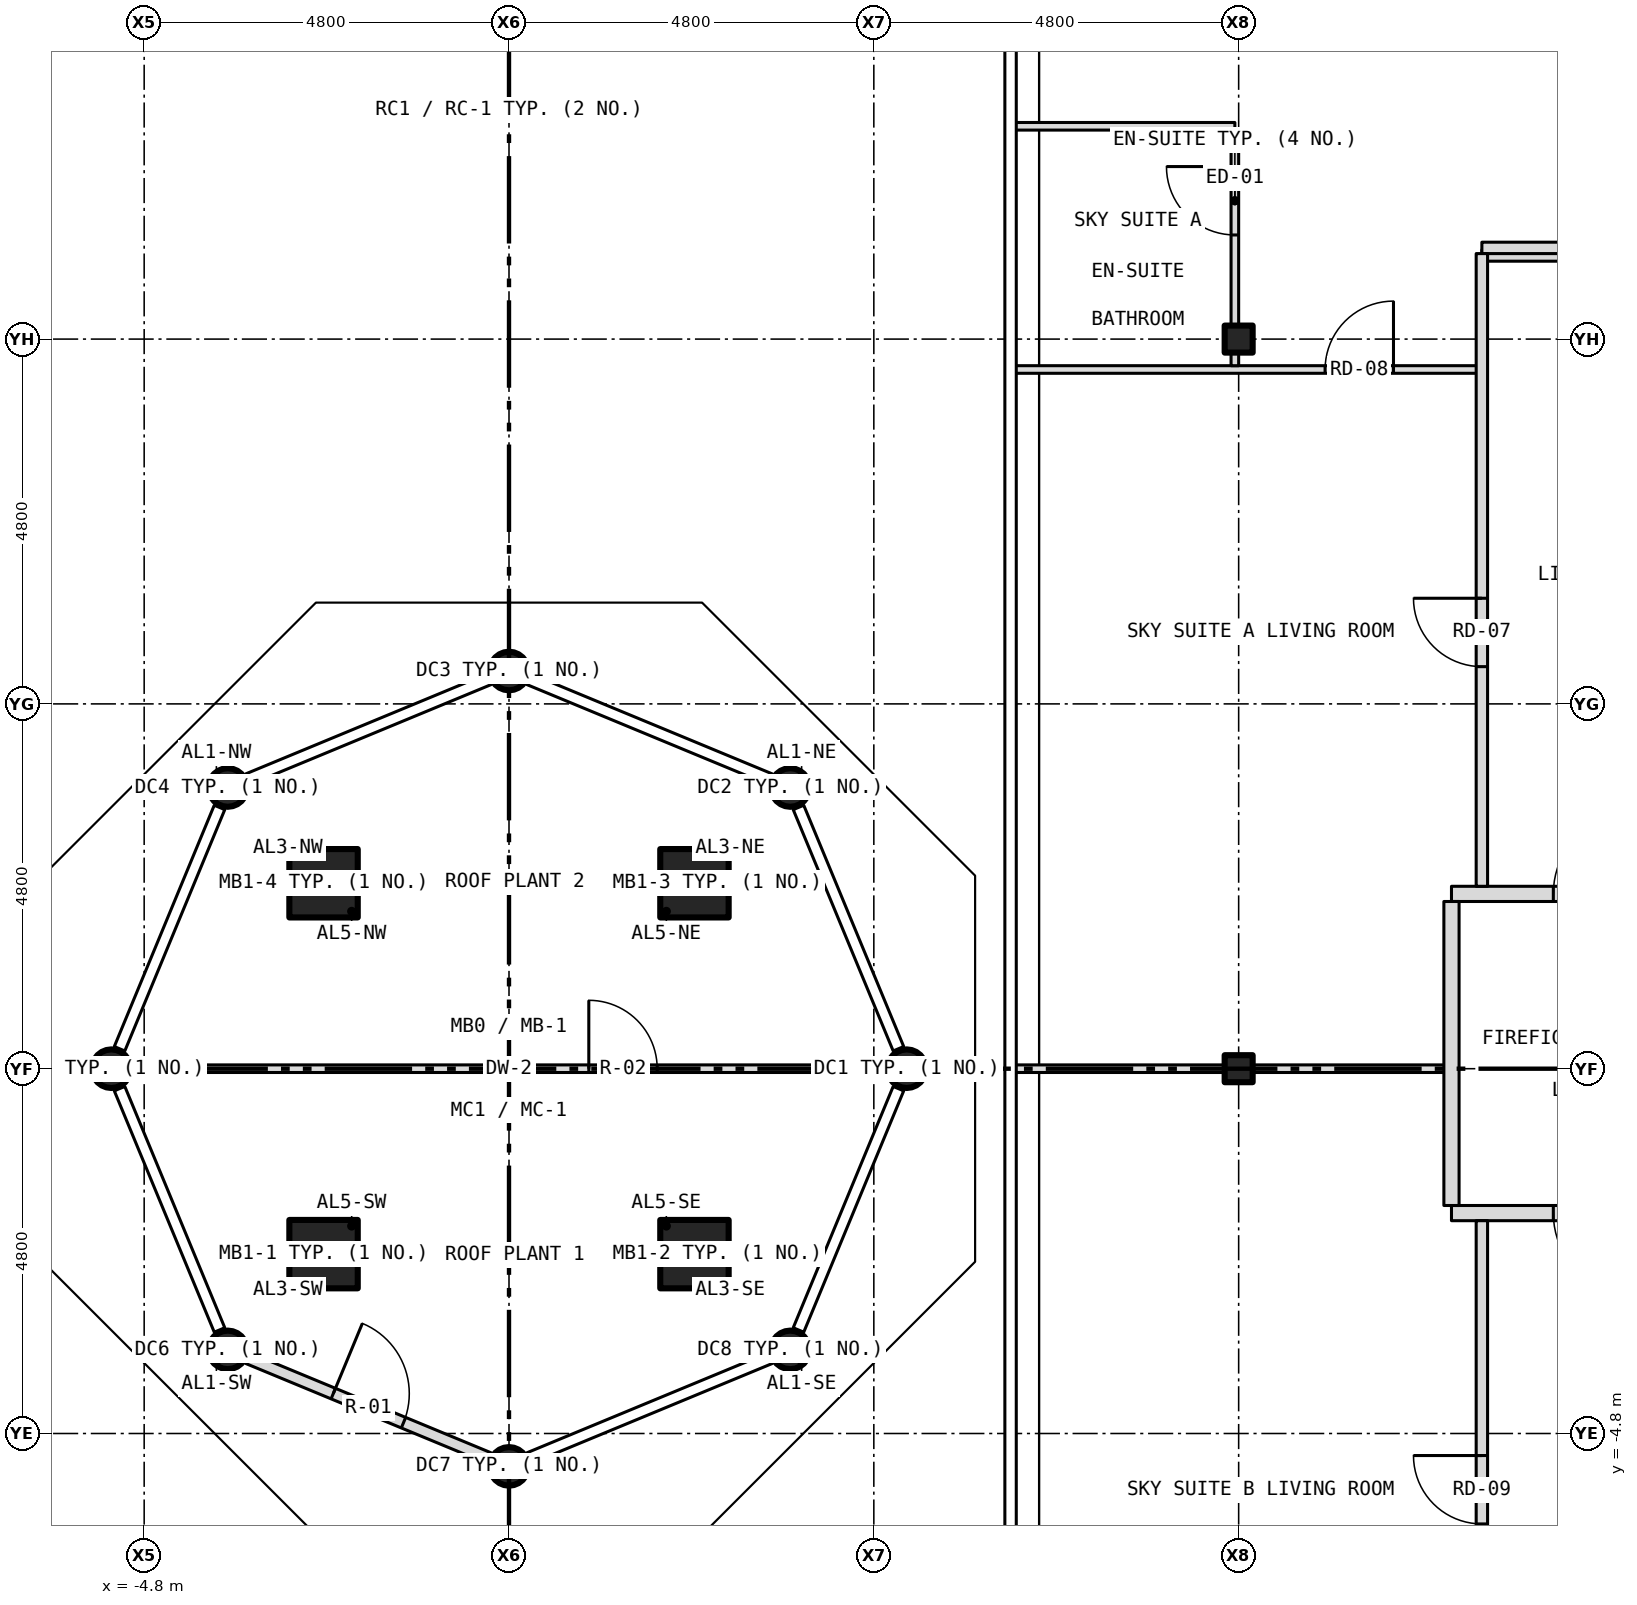
"""IFC4 building model, lengths in metres.
Left out: names, types, materials, properties, quantities, classifications, styles, units other than length and angle.
Written with IfcOpenShell. Run it as: python <this file> out.ifc"""

import sys

from ifc_helpers import new_model, si_unit, direction, frame, frame_2d, origin, origin_2d, place, context, subcontext, project, spatial, rectangle, hollow_circle, i_section, extrude, element, fill, save


model = new_model("IFC4")
c1 = context("Model", 3, precision=1e-05, world=origin(), true_north=direction((0.0, 1.0)))
c2 = subcontext(c1, "Body", "Model", "MODEL_VIEW")
j1 = project(units=[si_unit("LENGTHUNIT", "METRE"), si_unit("PLANEANGLEUNIT", "RADIAN")], contexts=[c1])
p1 = place(None, origin())
s1 = spatial("IfcSite", under=j1, at=p1, CompositionType="ELEMENT")
p2 = place(p1, origin())
s2 = spatial("IfcBuilding", under=s1, at=p2, CompositionType="ELEMENT")
p3 = place(p2, frame((0.0, 0.0, 265.5)))
s3 = spatial("IfcBuildingStorey", under=s2, at=p3, CompositionType="ELEMENT", Elevation=265.5)
for number, where, z_axis, x_axis in (
    (1, (9.6, 0.0, -0.25), (0.0, 0.0, 1.0), (1.0, 0.0, 0.0)),
    (2, (9.6, 9.6, -0.25), (0.0, 0.0, 1.0), (1.0, 0.0, 0.0)),
):
    element("IfcColumn", number, at=place(p3, frame(where, z_axis=z_axis, x_axis=x_axis)), inside=s3, PredefinedType="COLUMN", context=c2, shape_type="SweptSolid", body=[
        extrude(i_section(OverallWidth=0.368, OverallDepth=0.356, WebThickness=0.011, FlangeThickness=0.018, at=origin_2d()), origin(), (0.0, 0.0, 1.0), 3.6),
    ])
for number, where, z_axis, x_axis in (
    (3, (5.233, 0.0, 0.5), (0.0, 0.0, 1.0), (1.0, 0.0, 0.0)),
    (4, (3.7, 3.7, 0.5), (0.0, 0.0, 1.0), (1.0, 0.0, 0.0)),
    (5, (0.0, 5.233, 0.5), (0.0, 0.0, 1.0), (1.0, 0.0, 0.0)),
    (6, (-3.7, 3.7, 0.5), (0.0, 0.0, 1.0), (1.0, 0.0, 0.0)),
    (7, (-5.233, 0.0, 0.5), (0.0, 0.0, 1.0), (1.0, 0.0, 0.0)),
    (8, (-3.7, -3.7, 0.5), (0.0, 0.0, 1.0), (1.0, 0.0, 0.0)),
    (9, (0.0, -5.233, 0.5), (0.0, 0.0, 1.0), (1.0, 0.0, 0.0)),
    (10, (3.7, -3.7, 0.5), (0.0, 0.0, 1.0), (1.0, 0.0, 0.0)),
):
    element("IfcColumn", number, at=place(p3, frame(where, z_axis=z_axis, x_axis=x_axis)), inside=s3, PredefinedType="COLUMN", context=c2, shape_type="SweptSolid", body=[
        extrude(hollow_circle(Radius=0.254, WallThickness=0.012, at=origin_2d()), origin(), (0.0, 0.0, 1.0), 3.0),
    ])
p4 = place(p3, frame((-3.438, -3.809, 0.5), z_axis=(0.0, 0.0, 1.0), x_axis=(0.923875699159, -0.382692686764, 0.0)))
e11 = element("IfcWall", 11, at=p4, inside=s3, PredefinedType="SOLIDWALL", context=c2, shape_type="SweptSolid", body=[
    extrude(rectangle(XDim=3.437, YDim=0.15, at=frame_2d((1.718, 0.0))), origin(), (0.0, 0.0, 1.0), 6.3),
])
p5 = place(p4, frame((1.219, 0.0, 0.0)))
e12 = element("IfcOpeningElement", 12, at=p5, cuts=e11, PredefinedType="OPENING", context=c2, shape_type="SweptSolid", body=[
    extrude(rectangle(XDim=1.0, YDim=2.1, at=frame_2d((0.5, 1.05))), frame((0.0, 0.087, 0.0), z_axis=(0.0, -1.0, 0.0), x_axis=(1.0, 0.0, 0.0)), (0.0, 0.0, 1.0), 0.174),
])
p6 = place(p3, frame((-4.979, 0.0, 0.5), z_axis=(0.0, 0.0, 1.0), x_axis=(1.0, 0.0, 0.0)))
e13 = element("IfcWall", 13, at=p6, inside=s3, PredefinedType="PARTITIONING", context=c2, shape_type="SweptSolid", body=[
    extrude(rectangle(XDim=9.957, YDim=0.1, at=frame_2d((4.979, 0.0))), origin(), (0.0, 0.0, 1.0), 6.294),
])
p7 = place(p6, frame((6.029, 0.0, 0.0)))
e14 = element("IfcOpeningElement", 14, at=p7, cuts=e13, PredefinedType="OPENING", context=c2, shape_type="SweptSolid", body=[
    extrude(rectangle(XDim=0.9, YDim=2.1, at=frame_2d((0.45, 1.05))), frame((0.0, 0.062, 0.0), z_axis=(0.0, -1.0, 0.0), x_axis=(1.0, 0.0, 0.0)), (0.0, 0.0, 1.0), 0.124),
])
for number, where, z_axis, x_axis in (
    (15, (-2.44, -2.44, 43.7), (0.0, 0.0, 1.0), (1.0, 0.0, 0.0)),
    (16, (2.44, -2.44, 43.7), (0.0, 0.0, 1.0), (1.0, 0.0, 0.0)),
    (17, (2.44, 2.44, 43.7), (0.0, 0.0, 1.0), (1.0, 0.0, 0.0)),
    (18, (-2.44, 2.44, 43.7), (0.0, 0.0, 1.0), (1.0, 0.0, 0.0)),
):
    element("IfcColumn", number, at=place(p3, frame(where, z_axis=z_axis, x_axis=x_axis)), inside=s3, PredefinedType="COLUMN", context=c2, shape_type="SweptSolid", body=[
        extrude(rectangle(XDim=0.9, YDim=0.9, at=origin_2d()), origin(), (0.0, 0.0, 1.0), 0.2),
    ])
p8 = place(p3, frame((12.4, -1.9, 0.0), z_axis=(0.0, 0.0, 1.0), x_axis=(1.0, 0.0, 0.0)))
e19 = element("IfcWall", 19, at=p8, inside=s3, PredefinedType="PARTITIONING", context=c2, shape_type="SweptSolid", body=[
    extrude(rectangle(XDim=3.28, YDim=0.2, at=frame_2d((1.64, 0.0))), origin(), (0.0, 0.0, 1.0), 3.35),
])
p9 = place(p8, frame((1.34, 0.0, 0.0)))
e20 = element("IfcOpeningElement", 20, at=p9, cuts=e19, PredefinedType="OPENING", context=c2, shape_type="SweptSolid", body=[
    extrude(rectangle(XDim=1.1, YDim=2.1, at=frame_2d((0.55, 1.05))), frame((0.0, 0.112, 0.0), z_axis=(0.0, -1.0, 0.0), x_axis=(1.0, 0.0, 0.0)), (0.0, 0.0, 1.0), 0.224),
])
p10 = place(p3, frame((6.644, 0.0, 0.0), z_axis=(0.0, 0.0, 1.0), x_axis=(1.0, 0.0, 0.0)))
e21 = element("IfcWall", 21, at=p10, inside=s3, PredefinedType="PARTITIONING", context=c2, shape_type="SweptSolid", body=[
    extrude(rectangle(XDim=2.772, YDim=0.1, at=frame_2d((1.386, 0.0))), origin(), (0.0, 0.0, 1.0), 2.728),
])
p11 = place(p3, frame((9.416, 0.0, 0.0), z_axis=(0.0, 0.0, 1.0), x_axis=(1.0, 0.0, 0.0)))
e22 = element("IfcWall", 22, at=p11, inside=s3, PredefinedType="PARTITIONING", context=c2, shape_type="SweptSolid", body=[
    extrude(rectangle(XDim=0.368, YDim=0.1, at=frame_2d((0.184, 0.0))), origin(), (0.0, 0.0, 1.0), 3.35),
])
p12 = place(p3, frame((9.784, 0.0, 0.0), z_axis=(0.0, 0.0, 1.0), x_axis=(1.0, 0.0, 0.0)))
e23 = element("IfcWall", 23, at=p12, inside=s3, PredefinedType="PARTITIONING", context=c2, shape_type="SweptSolid", body=[
    extrude(rectangle(XDim=2.616, YDim=0.1, at=frame_2d((1.308, 0.0))), origin(), (0.0, 0.0, 1.0), 2.728),
])
p13 = place(p3, frame((12.4, 2.3, 0.0), z_axis=(0.0, 0.0, 1.0), x_axis=(1.0, 0.0, 0.0)))
e24 = element("IfcWall", 24, at=p13, inside=s3, PredefinedType="PARTITIONING", context=c2, shape_type="SweptSolid", body=[
    extrude(rectangle(XDim=3.28, YDim=0.2, at=frame_2d((1.64, 0.0))), origin(), (0.0, 0.0, 1.0), 3.35),
])
p14 = place(p13, frame((1.34, 0.0, 0.0)))
e25 = element("IfcOpeningElement", 25, at=p14, cuts=e24, PredefinedType="OPENING", context=c2, shape_type="SweptSolid", body=[
    extrude(rectangle(XDim=1.1, YDim=2.1, at=frame_2d((0.55, 1.05))), frame((0.0, 0.112, 0.0), z_axis=(0.0, -1.0, 0.0), x_axis=(1.0, 0.0, 0.0)), (0.0, 0.0, 1.0), 0.224),
])
p15 = place(p3, frame((6.644, 9.2, 0.0), z_axis=(0.0, 0.0, 1.0), x_axis=(1.0, 0.0, 0.0)))
e26 = element("IfcWall", 26, at=p15, inside=s3, PredefinedType="PARTITIONING", context=c2, shape_type="SweptSolid", body=[
    extrude(rectangle(XDim=6.156, YDim=0.1, at=frame_2d((3.078, 0.0))), origin(), (0.0, 0.0, 1.0), 3.35),
])
p16 = place(p15, frame((4.093, 0.0, 0.0)))
e27 = element("IfcOpeningElement", 27, at=p16, cuts=e26, PredefinedType="OPENING", context=c2, shape_type="SweptSolid", body=[
    extrude(rectangle(XDim=0.9, YDim=2.1, at=frame_2d((0.45, 1.05))), frame((0.0, 0.062, 0.0), z_axis=(0.0, -1.0, 0.0), x_axis=(1.0, 0.0, 0.0)), (0.0, 0.0, 1.0), 0.124),
])
for number, where, z_axis, x_axis in (
    (28, (12.8, 10.7, 0.0), (0.0, 0.0, 1.0), (1.0, 0.0, 0.0)),
    (29, (12.8, 10.8, 0.0), (0.0, 0.0, 1.0), (1.0, 0.0, 0.0)),
):
    element("IfcWall", number, at=place(p3, frame(where, z_axis=z_axis, x_axis=x_axis)), inside=s3, PredefinedType="PARTITIONING", context=c2, shape_type="SweptSolid", body=[
        extrude(rectangle(XDim=2.88, YDim=0.15, at=frame_2d((1.44, 0.0))), origin(), (0.0, 0.0, 1.0), 3.35),
    ])
p17 = place(p3, frame((6.644, 12.4, 0.0), z_axis=(0.0, 0.0, 1.0), x_axis=(1.0, 0.0, 0.0)))
e30 = element("IfcWall", 30, at=p17, inside=s3, PredefinedType="PARTITIONING", context=c2, shape_type="SweptSolid", body=[
    extrude(rectangle(XDim=2.906, YDim=0.1, at=frame_2d((1.453, 0.0))), origin(), (0.0, 0.0, 1.0), 3.35),
])
p18 = place(p3, frame((9.55, 9.25, 0.0), z_axis=(0.0, 0.0, 1.0), x_axis=(0.0, 1.0, 0.0)))
e31 = element("IfcWall", 31, at=p18, inside=s3, PredefinedType="PARTITIONING", context=c2, shape_type="SweptSolid", body=[
    extrude(rectangle(XDim=0.534, YDim=0.1, at=frame_2d((0.267, 0.0))), origin(), (0.0, 0.0, 1.0), 3.35),
])
p19 = place(p3, frame((9.55, 9.784, 0.0), z_axis=(0.0, 0.0, 1.0), x_axis=(0.0, 1.0, 0.0)))
e32 = element("IfcWall", 32, at=p19, inside=s3, PredefinedType="PARTITIONING", context=c2, shape_type="SweptSolid", body=[
    extrude(rectangle(XDim=2.566, YDim=0.1, at=frame_2d((1.283, 0.0))), origin(), (0.0, 0.0, 1.0), 2.728),
])
p20 = place(p19, frame((1.186, 0.0, 0.0)))
e33 = element("IfcOpeningElement", 33, at=p20, cuts=e32, PredefinedType="OPENING", context=c2, shape_type="SweptSolid", body=[
    extrude(rectangle(XDim=0.9, YDim=2.1, at=frame_2d((0.45, 1.05))), frame((0.0, 0.062, 0.0), z_axis=(0.0, -1.0, 0.0), x_axis=(1.0, 0.0, 0.0)), (0.0, 0.0, 1.0), 0.124),
])
p21 = place(p3, frame((12.4, -1.8, 0.0), z_axis=(0.0, 0.0, 1.0), x_axis=(0.0, 1.0, 0.0)))
e34 = element("IfcWall", 34, at=p21, inside=s3, PredefinedType="PARTITIONING", context=c2, shape_type="SweptSolid", body=[
    extrude(rectangle(XDim=4.0, YDim=0.2, at=frame_2d((2.0, 0.0))), origin(), (0.0, 0.0, 1.0), 3.35),
])
p22 = place(p3, frame((12.8, -10.725, 0.0), z_axis=(0.0, 0.0, 1.0), x_axis=(0.0, 1.0, 0.0)))
e35 = element("IfcWall", 35, at=p22, inside=s3, PredefinedType="PARTITIONING", context=c2, shape_type="SweptSolid", body=[
    extrude(rectangle(XDim=8.725, YDim=0.15, at=frame_2d((4.363, 0.0))), origin(), (0.0, 0.0, 1.0), 3.35),
])
p23 = place(p22, frame((4.735, 0.0, 0.0)))
e36 = element("IfcOpeningElement", 36, at=p23, cuts=e35, PredefinedType="OPENING", context=c2, shape_type="SweptSolid", body=[
    extrude(rectangle(XDim=0.9, YDim=2.1, at=frame_2d((0.45, 1.05))), frame((0.0, 0.087, 0.0), z_axis=(0.0, -1.0, 0.0), x_axis=(1.0, 0.0, 0.0)), (0.0, 0.0, 1.0), 0.174),
])
p24 = place(p3, frame((12.8, 2.4, 0.0), z_axis=(0.0, 0.0, 1.0), x_axis=(0.0, 1.0, 0.0)))
e37 = element("IfcWall", 37, at=p24, inside=s3, PredefinedType="PARTITIONING", context=c2, shape_type="SweptSolid", body=[
    extrude(rectangle(XDim=8.325, YDim=0.15, at=frame_2d((4.163, 0.0))), origin(), (0.0, 0.0, 1.0), 3.35),
])
p25 = place(p24, frame((2.89, 0.0, 0.0)))
e38 = element("IfcOpeningElement", 38, at=p25, cuts=e37, PredefinedType="OPENING", context=c2, shape_type="SweptSolid", body=[
    extrude(rectangle(XDim=0.9, YDim=2.1, at=frame_2d((0.45, 1.05))), frame((0.0, 0.087, 0.0), z_axis=(0.0, -1.0, 0.0), x_axis=(1.0, 0.0, 0.0)), (0.0, 0.0, 1.0), 0.174),
])
p26 = place(p5, origin())
e39 = element("IfcDoor", 39, at=p26, inside=s3, OperationType="SINGLE_SWING_LEFT", PredefinedType="DOOR", context=c2, shape_type="SweptSolid", body=[
    extrude(rectangle(XDim=1.0, YDim=2.1, at=frame_2d((0.5, 1.05))), frame((0.0, 0.025, 0.0), z_axis=(0.0, -1.0, 0.0), x_axis=(1.0, 0.0, 0.0)), (0.0, 0.0, 1.0), 0.05),
])
fill(e12, e39)
p27 = place(p7, origin())
e40 = element("IfcDoor", 40, at=p27, inside=s3, OperationType="SINGLE_SWING_LEFT", PredefinedType="DOOR", context=c2, shape_type="SweptSolid", body=[
    extrude(rectangle(XDim=0.9, YDim=2.1, at=frame_2d((0.45, 1.05))), frame((0.0, 0.025, 0.0), z_axis=(0.0, -1.0, 0.0), x_axis=(1.0, 0.0, 0.0)), (0.0, 0.0, 1.0), 0.05),
])
fill(e14, e40)
p28 = place(p14, origin())
e41 = element("IfcDoor", 41, at=p28, inside=s3, OperationType="SINGLE_SWING_RIGHT", PredefinedType="DOOR", context=c2, shape_type="SweptSolid", body=[
    extrude(rectangle(XDim=1.1, YDim=2.1, at=frame_2d((0.55, 1.05))), frame((0.0, 0.025, 0.0), z_axis=(0.0, -1.0, 0.0), x_axis=(1.0, 0.0, 0.0)), (0.0, 0.0, 1.0), 0.05),
])
fill(e25, e41)
p29 = place(p9, origin())
e42 = element("IfcDoor", 42, at=p29, inside=s3, OperationType="SINGLE_SWING_RIGHT", PredefinedType="DOOR", context=c2, shape_type="SweptSolid", body=[
    extrude(rectangle(XDim=1.1, YDim=2.1, at=frame_2d((0.55, 1.05))), frame((0.0, 0.025, 0.0), z_axis=(0.0, -1.0, 0.0), x_axis=(1.0, 0.0, 0.0)), (0.0, 0.0, 1.0), 0.05),
])
fill(e20, e42)
p30 = place(p25, origin())
e43 = element("IfcDoor", 43, at=p30, inside=s3, OperationType="SINGLE_SWING_RIGHT", PredefinedType="DOOR", context=c2, shape_type="SweptSolid", body=[
    extrude(rectangle(XDim=0.9, YDim=2.1, at=frame_2d((0.45, 1.05))), frame((0.0, 0.025, 0.0), z_axis=(0.0, -1.0, 0.0), x_axis=(1.0, 0.0, 0.0)), (0.0, 0.0, 1.0), 0.05),
])
fill(e38, e43)
p31 = place(p16, origin())
e44 = element("IfcDoor", 44, at=p31, inside=s3, OperationType="SINGLE_SWING_RIGHT", PredefinedType="DOOR", context=c2, shape_type="SweptSolid", body=[
    extrude(rectangle(XDim=0.9, YDim=2.1, at=frame_2d((0.45, 1.05))), frame((0.0, 0.025, 0.0), z_axis=(0.0, -1.0, 0.0), x_axis=(1.0, 0.0, 0.0)), (0.0, 0.0, 1.0), 0.05),
])
fill(e27, e44)
p32 = place(p20, origin())
e45 = element("IfcDoor", 45, at=p32, inside=s3, OperationType="SINGLE_SWING_RIGHT", PredefinedType="DOOR", context=c2, shape_type="SweptSolid", body=[
    extrude(rectangle(XDim=0.9, YDim=2.1, at=frame_2d((0.45, 1.05))), frame((0.0, 0.025, 0.0), z_axis=(0.0, -1.0, 0.0), x_axis=(1.0, 0.0, 0.0)), (0.0, 0.0, 1.0), 0.05),
])
fill(e33, e45)
p33 = place(p23, origin())
e46 = element("IfcDoor", 46, at=p33, inside=s3, OperationType="SINGLE_SWING_RIGHT", PredefinedType="DOOR", context=c2, shape_type="SweptSolid", body=[
    extrude(rectangle(XDim=0.9, YDim=2.1, at=frame_2d((0.45, 1.05))), frame((0.0, 0.025, 0.0), z_axis=(0.0, -1.0, 0.0), x_axis=(1.0, 0.0, 0.0)), (0.0, 0.0, 1.0), 0.05),
])
fill(e36, e46)
save(model, sys.argv[1])
